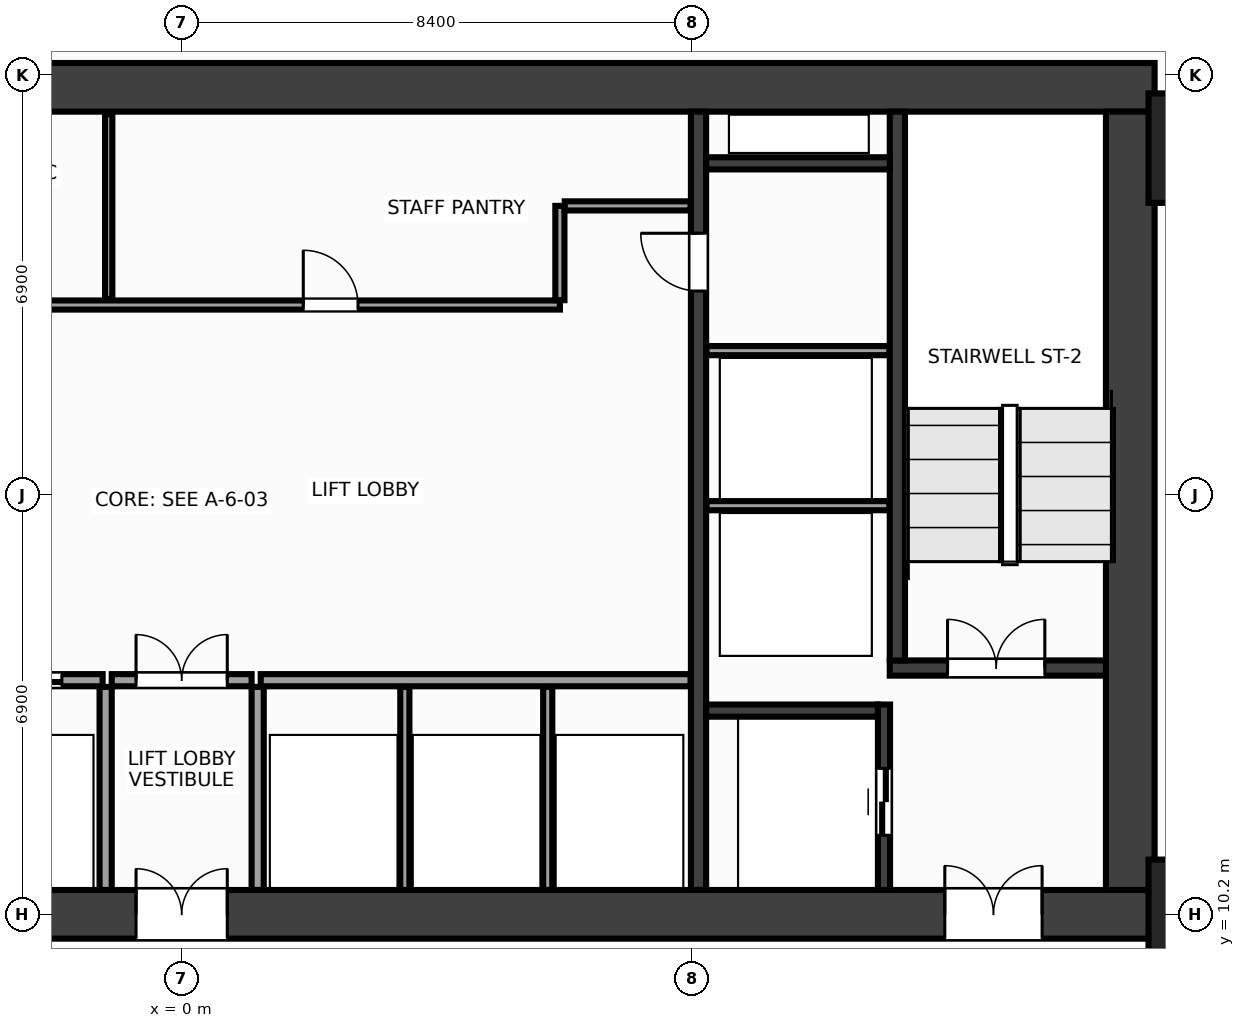
"""IFC4 building model, lengths in metres.
Left out: names, types, materials, properties, quantities, classifications, styles, units other than length and angle.
Written with IfcOpenShell. Run it as: python <this file> out.ifc"""

import sys

from ifc_helpers import new_model, si_unit, direction, frame, frame_2d, origin, origin_2d, place, context, subcontext, project, spatial, rectangle, extrude, source, transform, mapped, element, fill, save


model = new_model("IFC4")
c1 = context("Model", 3, precision=1e-05, world=origin(), true_north=direction((0.0, 1.0)))
c2 = subcontext(c1, "Body", "Model", "MODEL_VIEW")
j1 = project(units=[si_unit("LENGTHUNIT", "METRE"), si_unit("PLANEANGLEUNIT", "RADIAN")], contexts=[c1])
p1 = place(None, origin())
s1 = spatial("IfcSite", under=j1, at=p1, CompositionType="ELEMENT")
p2 = place(p1, origin())
s2 = spatial("IfcBuilding", under=s1, at=p2, CompositionType="ELEMENT")
p3 = place(p2, frame((0.0, 0.0, 27.2)))
s3 = spatial("IfcBuildingStorey", under=s2, at=p3, CompositionType="ELEMENT", Elevation=27.2)
m1 = source(origin(), c2, "Body", "SweptSolid", [
    extrude(rectangle(XDim=32.0, YDim=0.8, at=frame_2d((16.0, 0.0))), origin(), (0.0, 0.0, 1.0), 3.6),
])
p4 = place(p3, frame((-16.0, 23.8, 0.0), z_axis=(0.0, 0.0, 1.0), x_axis=(1.0, 0.0, 0.0)))
e1 = element("IfcWall", 1, at=p4, inside=s3, PredefinedType="SHEAR", context=c2, shape_type="MappedRepresentation", body=[
    mapped(m1, transform((0.0, 0.0, 0.0), x_axis=(1.0, 0.0, 0.0), y_axis=(0.0, 1.0, 0.0), z_axis=(0.0, 0.0, 1.0), scale=1.0)),
])
p5 = place(p3, frame((-16.0, 10.2, 0.0), z_axis=(0.0, 0.0, 1.0), x_axis=(1.0, 0.0, 0.0)))
e2 = element("IfcWall", 2, at=p5, inside=s3, PredefinedType="SHEAR", context=c2, shape_type="MappedRepresentation", body=[
    mapped(m1, transform((0.0, 0.0, 0.0), x_axis=(1.0, 0.0, 0.0), y_axis=(0.0, 1.0, 0.0), z_axis=(0.0, 0.0, 1.0), scale=1.0)),
])
p6 = place(p5, frame((1.85, 0.0, 0.0)))
e3 = element("IfcOpeningElement", 3, at=p6, cuts=e2, PredefinedType="OPENING", context=c2, shape_type="SweptSolid", body=[
    extrude(rectangle(XDim=1.6, YDim=2.15, at=frame_2d((0.8, 1.075))), frame((0.0, 0.412, 0.0), z_axis=(0.0, -1.0, 0.0), x_axis=(1.0, 0.0, 0.0)), (0.0, 0.0, 1.0), 0.824),
])
p7 = place(p5, frame((28.55, 0.0, 0.0)))
e4 = element("IfcOpeningElement", 4, at=p7, cuts=e2, PredefinedType="OPENING", context=c2, shape_type="SweptSolid", body=[
    extrude(rectangle(XDim=1.6, YDim=2.15, at=frame_2d((0.8, 1.075))), frame((0.0, 0.412, 0.0), z_axis=(0.0, -1.0, 0.0), x_axis=(1.0, 0.0, 0.0)), (0.0, 0.0, 1.0), 0.824),
])
p8 = place(p5, frame((15.25, 0.0, 0.0)))
e5 = element("IfcOpeningElement", 5, at=p8, cuts=e2, PredefinedType="OPENING", context=c2, shape_type="SweptSolid", body=[
    extrude(rectangle(XDim=1.5, YDim=2.2, at=frame_2d((0.75, 1.1))), frame((0.0, 0.412, 0.0), z_axis=(0.0, -1.0, 0.0), x_axis=(1.0, 0.0, 0.0)), (0.0, 0.0, 1.0), 0.824),
])
m2 = source(origin(), c2, "Body", "SweptSolid", [
    extrude(rectangle(XDim=12.8, YDim=0.8, at=frame_2d((6.4, 0.0))), origin(), (0.0, 0.0, 1.0), 3.6),
])
p9 = place(p3, frame((15.6, 10.6, 0.0), z_axis=(0.0, 0.0, 1.0), x_axis=(0.0, 1.0, 0.0)))
e6 = element("IfcWall", 6, at=p9, inside=s3, PredefinedType="SHEAR", context=c2, shape_type="MappedRepresentation", body=[
    mapped(m2, transform((0.0, 0.0, 0.0), x_axis=(1.0, 0.0, 0.0), y_axis=(0.0, 1.0, 0.0), z_axis=(0.0, 0.0, 1.0), scale=1.0)),
])
m3 = source(origin(), c2, "Body", "SweptSolid", [
    extrude(rectangle(XDim=12.8, YDim=0.25, at=frame_2d((6.4, 0.0))), origin(), (0.0, 0.0, 1.0), 3.6),
])
p10 = place(p3, frame((8.5, 10.6, 0.0), z_axis=(0.0, 0.0, 1.0), x_axis=(0.0, 1.0, 0.0)))
e7 = element("IfcWall", 7, at=p10, inside=s3, PredefinedType="SHEAR", context=c2, shape_type="MappedRepresentation", body=[
    mapped(m3, transform((0.0, 0.0, 0.0), x_axis=(1.0, 0.0, 0.0), y_axis=(0.0, 1.0, 0.0), z_axis=(0.0, 0.0, 1.0), scale=1.0)),
])
p11 = place(p10, frame((9.85, 0.0, 0.0)))
e8 = element("IfcOpeningElement", 8, at=p11, cuts=e7, PredefinedType="OPENING", context=c2, shape_type="SweptSolid", body=[
    extrude(rectangle(XDim=0.95, YDim=2.15, at=frame_2d((0.475, 1.075))), frame((0.0, 0.137, 0.0), z_axis=(0.0, -1.0, 0.0), x_axis=(1.0, 0.0, 0.0)), (0.0, 0.0, 1.0), 0.274),
])
m4 = source(origin(), c2, "Body", "SweptSolid", [
    extrude(rectangle(XDim=3.555, YDim=0.25, at=frame_2d((1.777, 0.0))), origin(), (0.0, 0.0, 1.0), 3.6),
])
p12 = place(p3, frame((11.645, 14.25, 0.0), z_axis=(0.0, 0.0, 1.0), x_axis=(1.0, 0.0, 0.0)))
e9 = element("IfcWall", 9, at=p12, inside=s3, PredefinedType="SHEAR", context=c2, shape_type="MappedRepresentation", body=[
    mapped(m4, transform((0.0, 0.0, 0.0), x_axis=(1.0, 0.0, 0.0), y_axis=(0.0, 1.0, 0.0), z_axis=(0.0, 0.0, 1.0), scale=1.0)),
])
p13 = place(p12, frame((0.95, 0.0, 0.0)))
e10 = element("IfcOpeningElement", 10, at=p13, cuts=e9, PredefinedType="OPENING", context=c2, shape_type="SweptSolid", body=[
    extrude(rectangle(XDim=1.6, YDim=2.15, at=frame_2d((0.8, 1.075))), frame((0.0, 0.137, 0.0), z_axis=(0.0, -1.0, 0.0), x_axis=(1.0, 0.0, 0.0)), (0.0, 0.0, 1.0), 0.274),
])
m5 = source(origin(), c2, "Body", "SweptSolid", [
    extrude(rectangle(XDim=9.025, YDim=0.25, at=frame_2d((4.512, 0.0))), origin(), (0.0, 0.0, 1.0), 3.6),
])
p14 = place(p3, frame((11.77, 14.375, 0.0), z_axis=(0.0, 0.0, 1.0), x_axis=(0.0, 1.0, 0.0)))
e11 = element("IfcWall", 11, at=p14, inside=s3, PredefinedType="SHEAR", context=c2, shape_type="MappedRepresentation", body=[
    mapped(m5, transform((0.0, 0.0, 0.0), x_axis=(1.0, 0.0, 0.0), y_axis=(0.0, 1.0, 0.0), z_axis=(0.0, 0.0, 1.0), scale=1.0)),
])
m6 = source(origin(), c2, "Body", "SweptSolid", [
    extrude(rectangle(XDim=3.05, YDim=0.2, at=frame_2d((1.525, 0.0))), origin(), (0.0, 0.0, 1.0), 3.6),
])
p15 = place(p3, frame((11.55, 10.6, 0.0), z_axis=(0.0, 0.0, 1.0), x_axis=(0.0, 1.0, 0.0)))
e12 = element("IfcWall", 12, at=p15, inside=s3, PredefinedType="SHEAR", context=c2, shape_type="MappedRepresentation", body=[
    mapped(m6, transform((0.0, 0.0, 0.0), x_axis=(1.0, 0.0, 0.0), y_axis=(0.0, 1.0, 0.0), z_axis=(0.0, 0.0, 1.0), scale=1.0)),
])
p16 = place(p15, frame((0.9, 0.0, 0.0)))
e13 = element("IfcOpeningElement", 13, at=p16, cuts=e12, PredefinedType="OPENING", context=c2, shape_type="SweptSolid", body=[
    extrude(rectangle(XDim=1.1, YDim=2.15, at=frame_2d((0.55, 1.075))), frame((0.0, 0.112, 0.0), z_axis=(0.0, -1.0, 0.0), x_axis=(1.0, 0.0, 0.0)), (0.0, 0.0, 1.0), 0.224),
])
m7 = source(origin(), c2, "Body", "SweptSolid", [
    extrude(rectangle(XDim=2.825, YDim=0.2, at=frame_2d((1.413, 0.0))), origin(), (0.0, 0.0, 1.0), 3.6),
])
p17 = place(p3, frame((8.625, 13.55, 0.0), z_axis=(0.0, 0.0, 1.0), x_axis=(1.0, 0.0, 0.0)))
e14 = element("IfcWall", 14, at=p17, inside=s3, PredefinedType="SHEAR", context=c2, shape_type="MappedRepresentation", body=[
    mapped(m7, transform((0.0, 0.0, 0.0), x_axis=(1.0, 0.0, 0.0), y_axis=(0.0, 1.0, 0.0), z_axis=(0.0, 0.0, 1.0), scale=1.0)),
])
m8 = source(origin(), c2, "Body", "SweptSolid", [
    extrude(rectangle(XDim=3.02, YDim=0.2, at=frame_2d((1.51, 0.0))), origin(), (0.0, 0.0, 1.0), 3.6),
])
p18 = place(p3, frame((8.625, 22.55, 0.0), z_axis=(0.0, 0.0, 1.0), x_axis=(1.0, 0.0, 0.0)))
e15 = element("IfcWall", 15, at=p18, inside=s3, PredefinedType="SHEAR", context=c2, shape_type="MappedRepresentation", body=[
    mapped(m8, transform((0.0, 0.0, 0.0), x_axis=(1.0, 0.0, 0.0), y_axis=(0.0, 1.0, 0.0), z_axis=(0.0, 0.0, 1.0), scale=1.0)),
])
m9 = source(origin(), c2, "Body", "SweptSolid", [
    extrude(rectangle(XDim=1.8, YDim=1.8, at=origin_2d()), origin(), (0.0, 0.0, 1.0), 3.6),
])
for number, where, z_axis, x_axis in (
    (16, (16.8, 10.2, 0.0), (0.0, 0.0, 1.0), (1.0, 0.0, 0.0)),
    (17, (16.8, 22.8, 0.0), (0.0, 0.0, 1.0), (1.0, 0.0, 0.0)),
):
    element("IfcColumn", number, at=place(p3, frame(where, z_axis=z_axis, x_axis=x_axis)), inside=s3, PredefinedType="COLUMN", context=c2, shape_type="MappedRepresentation", body=[
        mapped(m9, transform((0.0, 0.0, 0.0), x_axis=(1.0, 0.0, 0.0), y_axis=(0.0, 1.0, 0.0), z_axis=(0.0, 0.0, 1.0), scale=1.0)),
    ])
m10 = source(origin(), c2, "Body", "SweptSolid", [
    extrude(rectangle(XDim=3.01, YDim=0.15, at=frame_2d((1.505, 0.0))), origin(), (0.0, 0.0, 1.0), 3.36),
])
for number, where, z_axis, x_axis in (
    (18, (8.63, 16.92, 0.0), (0.0, 0.0, 1.0), (1.0, 0.0, 0.0)),
    (19, (8.63, 19.47, 0.0), (0.0, 0.0, 1.0), (1.0, 0.0, 0.0)),
):
    element("IfcWall", number, at=place(p3, frame(where, z_axis=z_axis, x_axis=x_axis)), inside=s3, PredefinedType="PARTITIONING", context=c2, shape_type="MappedRepresentation", body=[
        mapped(m10, transform((0.0, 0.0, 0.0), x_axis=(1.0, 0.0, 0.0), y_axis=(0.0, 1.0, 0.0), z_axis=(0.0, 0.0, 1.0), scale=1.0)),
    ])
m11 = source(origin(), c2, "Body", "SweptSolid", [
    extrude(rectangle(XDim=7.07, YDim=0.2, at=frame_2d((3.535, 0.0))), origin(), (0.0, 0.0, 1.0), 3.36),
])
p19 = place(p3, frame((-8.37, 14.05, 0.0), z_axis=(0.0, 0.0, 1.0), x_axis=(1.0, 0.0, 0.0)))
e20 = element("IfcWall", 20, at=p19, inside=s3, PredefinedType="PARTITIONING", context=c2, shape_type="MappedRepresentation", body=[
    mapped(m11, transform((0.0, 0.0, 0.0), x_axis=(1.0, 0.0, 0.0), y_axis=(0.0, 1.0, 0.0), z_axis=(0.0, 0.0, 1.0), scale=1.0)),
])
p20 = place(p19, frame((0.6, 0.0, 0.0)))
e21 = element("IfcOpeningElement", 21, at=p20, cuts=e20, PredefinedType="OPENING", context=c2, shape_type="SweptSolid", body=[
    extrude(rectangle(XDim=1.1, YDim=2.15, at=frame_2d((0.55, 1.075))), frame((0.0, 0.112, 0.0), z_axis=(0.0, -1.0, 0.0), x_axis=(1.0, 0.0, 0.0)), (0.0, 0.0, 1.0), 0.224),
])
p21 = place(p19, frame((2.95, 0.0, 0.0)))
e22 = element("IfcOpeningElement", 22, at=p21, cuts=e20, PredefinedType="OPENING", context=c2, shape_type="SweptSolid", body=[
    extrude(rectangle(XDim=1.1, YDim=2.15, at=frame_2d((0.55, 1.075))), frame((0.0, 0.112, 0.0), z_axis=(0.0, -1.0, 0.0), x_axis=(1.0, 0.0, 0.0)), (0.0, 0.0, 1.0), 0.224),
])
p22 = place(p19, frame((5.3, 0.0, 0.0)))
e23 = element("IfcOpeningElement", 23, at=p22, cuts=e20, PredefinedType="OPENING", context=c2, shape_type="SweptSolid", body=[
    extrude(rectangle(XDim=1.1, YDim=2.15, at=frame_2d((0.55, 1.075))), frame((0.0, 0.112, 0.0), z_axis=(0.0, -1.0, 0.0), x_axis=(1.0, 0.0, 0.0)), (0.0, 0.0, 1.0), 0.224),
])
p23 = place(p3, frame((1.3, 14.05, 0.0), z_axis=(0.0, 0.0, 1.0), x_axis=(1.0, 0.0, 0.0)))
e24 = element("IfcWall", 24, at=p23, inside=s3, PredefinedType="PARTITIONING", context=c2, shape_type="MappedRepresentation", body=[
    mapped(m11, transform((0.0, 0.0, 0.0), x_axis=(1.0, 0.0, 0.0), y_axis=(0.0, 1.0, 0.0), z_axis=(0.0, 0.0, 1.0), scale=1.0)),
])
m12 = source(origin(), c2, "Body", "SweptSolid", [
    extrude(rectangle(XDim=3.34, YDim=0.2, at=frame_2d((1.67, 0.0))), origin(), (0.0, 0.0, 1.0), 3.36),
])
for number, where, z_axis, x_axis in (
    (25, (-1.25, 10.6, 0.0), (0.0, 0.0, 1.0), (0.0, 1.0, 0.0)),
    (26, (1.25, 10.6, 0.0), (0.0, 0.0, 1.0), (0.0, 1.0, 0.0)),
):
    element("IfcWall", number, at=place(p3, frame(where, z_axis=z_axis, x_axis=x_axis)), inside=s3, PredefinedType="PARTITIONING", context=c2, shape_type="MappedRepresentation", body=[
        mapped(m12, transform((0.0, 0.0, 0.0), x_axis=(1.0, 0.0, 0.0), y_axis=(0.0, 1.0, 0.0), z_axis=(0.0, 0.0, 1.0), scale=1.0)),
    ])
m13 = source(origin(), c2, "Body", "SweptSolid", [
    extrude(rectangle(XDim=2.3, YDim=0.2, at=frame_2d((1.15, 0.0))), origin(), (0.0, 0.0, 1.0), 3.36),
])
p24 = place(p3, frame((-1.15, 14.05, 0.0), z_axis=(0.0, 0.0, 1.0), x_axis=(1.0, 0.0, 0.0)))
e27 = element("IfcWall", 27, at=p24, inside=s3, PredefinedType="PARTITIONING", context=c2, shape_type="MappedRepresentation", body=[
    mapped(m13, transform((0.0, 0.0, 0.0), x_axis=(1.0, 0.0, 0.0), y_axis=(0.0, 1.0, 0.0), z_axis=(0.0, 0.0, 1.0), scale=1.0)),
])
p25 = place(p24, frame((0.4, 0.0, 0.0)))
e28 = element("IfcOpeningElement", 28, at=p25, cuts=e27, PredefinedType="OPENING", context=c2, shape_type="SweptSolid", body=[
    extrude(rectangle(XDim=1.5, YDim=2.2, at=frame_2d((0.75, 1.1))), frame((0.0, 0.112, 0.0), z_axis=(0.0, -1.0, 0.0), x_axis=(1.0, 0.0, 0.0)), (0.0, 0.0, 1.0), 0.224),
])
m14 = source(origin(), c2, "Body", "SweptSolid", [
    extrude(rectangle(XDim=14.59, YDim=0.15, at=frame_2d((7.295, 0.0))), origin(), (0.0, 0.0, 1.0), 3.36),
])
p26 = place(p3, frame((-8.37, 20.22, 0.0), z_axis=(0.0, 0.0, 1.0), x_axis=(1.0, 0.0, 0.0)))
e29 = element("IfcWall", 29, at=p26, inside=s3, PredefinedType="PARTITIONING", context=c2, shape_type="MappedRepresentation", body=[
    mapped(m14, transform((0.0, 0.0, 0.0), x_axis=(1.0, 0.0, 0.0), y_axis=(0.0, 1.0, 0.0), z_axis=(0.0, 0.0, 1.0), scale=1.0)),
])
p27 = place(p26, frame((1.36, 0.0, 0.0)))
e30 = element("IfcOpeningElement", 30, at=p27, cuts=e29, PredefinedType="OPENING", context=c2, shape_type="SweptSolid", body=[
    extrude(rectangle(XDim=0.9, YDim=2.15, at=frame_2d((0.45, 1.075))), frame((0.0, 0.087, 0.0), z_axis=(0.0, -1.0, 0.0), x_axis=(1.0, 0.0, 0.0)), (0.0, 0.0, 1.0), 0.174),
])
p28 = place(p26, frame((4.92, 0.0, 0.0)))
e31 = element("IfcOpeningElement", 31, at=p28, cuts=e29, PredefinedType="OPENING", context=c2, shape_type="SweptSolid", body=[
    extrude(rectangle(XDim=0.9, YDim=2.15, at=frame_2d((0.45, 1.075))), frame((0.0, 0.087, 0.0), z_axis=(0.0, -1.0, 0.0), x_axis=(1.0, 0.0, 0.0)), (0.0, 0.0, 1.0), 0.174),
])
p29 = place(p26, frame((10.37, 0.0, 0.0)))
e32 = element("IfcOpeningElement", 32, at=p29, cuts=e29, PredefinedType="OPENING", context=c2, shape_type="SweptSolid", body=[
    extrude(rectangle(XDim=0.9, YDim=2.15, at=frame_2d((0.45, 1.075))), frame((0.0, 0.087, 0.0), z_axis=(0.0, -1.0, 0.0), x_axis=(1.0, 0.0, 0.0)), (0.0, 0.0, 1.0), 0.174),
])
m15 = source(origin(), c2, "Body", "SweptSolid", [
    extrude(rectangle(XDim=1.55, YDim=0.15, at=frame_2d((0.775, 0.0))), origin(), (0.0, 0.0, 1.0), 3.36),
])
p30 = place(p3, frame((6.22, 20.3, 0.0), z_axis=(0.0, 0.0, 1.0), x_axis=(0.0, 1.0, 0.0)))
e33 = element("IfcWall", 33, at=p30, inside=s3, PredefinedType="PARTITIONING", context=c2, shape_type="MappedRepresentation", body=[
    mapped(m15, transform((0.0, 0.0, 0.0), x_axis=(1.0, 0.0, 0.0), y_axis=(0.0, 1.0, 0.0), z_axis=(0.0, 0.0, 1.0), scale=1.0)),
])
m16 = source(origin(), c2, "Body", "SweptSolid", [
    extrude(rectangle(XDim=2.07, YDim=0.15, at=frame_2d((1.035, 0.0))), origin(), (0.0, 0.0, 1.0), 3.36),
])
p31 = place(p3, frame((6.3, 21.85, 0.0), z_axis=(0.0, 0.0, 1.0), x_axis=(1.0, 0.0, 0.0)))
e34 = element("IfcWall", 34, at=p31, inside=s3, PredefinedType="PARTITIONING", context=c2, shape_type="MappedRepresentation", body=[
    mapped(m16, transform((0.0, 0.0, 0.0), x_axis=(1.0, 0.0, 0.0), y_axis=(0.0, 1.0, 0.0), z_axis=(0.0, 0.0, 1.0), scale=1.0)),
])
m17 = source(origin(), c2, "Body", "SweptSolid", [
    extrude(rectangle(XDim=3.34, YDim=0.15, at=frame_2d((1.67, 0.0))), origin(), (0.0, 0.0, 1.0), 3.36),
])
for number, where, z_axis, x_axis in (
    (35, (3.67, 10.6, 0.0), (0.0, 0.0, 1.0), (0.0, 1.0, 0.0)),
    (36, (6.02, 10.6, 0.0), (0.0, 0.0, 1.0), (0.0, 1.0, 0.0)),
):
    element("IfcWall", number, at=place(p3, frame(where, z_axis=z_axis, x_axis=x_axis)), inside=s3, PredefinedType="PARTITIONING", context=c2, shape_type="MappedRepresentation", body=[
        mapped(m17, transform((0.0, 0.0, 0.0), x_axis=(1.0, 0.0, 0.0), y_axis=(0.0, 1.0, 0.0), z_axis=(0.0, 0.0, 1.0), scale=1.0)),
    ])
m18 = source(origin(), c2, "Body", "SweptSolid", [
    extrude(rectangle(XDim=3.04, YDim=0.12, at=frame_2d((1.52, 0.0))), origin(), (0.0, 0.0, 1.0), 3.36),
])
p32 = place(p3, frame((-1.2, 20.32, 0.0), z_axis=(0.0, 0.0, 1.0), x_axis=(0.0, 1.0, 0.0)))
e37 = element("IfcWall", 37, at=p32, inside=s3, PredefinedType="PARTITIONING", context=c2, shape_type="MappedRepresentation", body=[
    mapped(m18, transform((0.0, 0.0, 0.0), x_axis=(1.0, 0.0, 0.0), y_axis=(0.0, 1.0, 0.0), z_axis=(0.0, 0.0, 1.0), scale=1.0)),
])
m19 = source(origin(), c2, "Body", "SweptSolid", [
    extrude(rectangle(XDim=1.6, YDim=2.15, at=frame_2d((0.8, 1.075))), frame((0.0, 0.025, 0.0), z_axis=(0.0, -1.0, 0.0), x_axis=(1.0, 0.0, 0.0)), (0.0, 0.0, 1.0), 0.05),
])
p33 = place(p13, origin())
e38 = element("IfcDoor", 38, at=p33, inside=s3, OperationType="DOUBLE_DOOR_SINGLE_SWING", PredefinedType="DOOR", context=c2, shape_type="MappedRepresentation", body=[
    mapped(m19, transform((0.0, 0.0, 0.0), x_axis=(1.0, 0.0, 0.0), y_axis=(0.0, 1.0, 0.0), z_axis=(0.0, 0.0, 1.0), scale=1.0)),
])
fill(e10, e38)
p34 = place(p7, origin())
e39 = element("IfcDoor", 39, at=p34, inside=s3, OperationType="DOUBLE_DOOR_SINGLE_SWING", PredefinedType="DOOR", context=c2, shape_type="MappedRepresentation", body=[
    mapped(m19, transform((0.0, 0.0, 0.0), x_axis=(1.0, 0.0, 0.0), y_axis=(0.0, 1.0, 0.0), z_axis=(0.0, 0.0, 1.0), scale=1.0)),
])
fill(e4, e39)
m20 = source(origin(), c2, "Body", "SweptSolid", [
    extrude(rectangle(XDim=1.1, YDim=2.15, at=frame_2d((0.55, 1.075))), frame((0.0, 0.025, 0.0), z_axis=(0.0, -1.0, 0.0), x_axis=(1.0, 0.0, 0.0)), (0.0, 0.0, 1.0), 0.05),
])
p35 = place(p16, origin())
e40 = element("IfcDoor", 40, at=p35, inside=s3, OperationType="DOUBLE_DOOR_SLIDING", PredefinedType="DOOR", context=c2, shape_type="MappedRepresentation", body=[
    mapped(m20, transform((0.0, 0.0, 0.0), x_axis=(1.0, 0.0, 0.0), y_axis=(0.0, 1.0, 0.0), z_axis=(0.0, 0.0, 1.0), scale=1.0)),
])
fill(e13, e40)
m21 = source(origin(), c2, "Body", "SweptSolid", [
    extrude(rectangle(XDim=0.95, YDim=2.15, at=frame_2d((0.475, 1.075))), frame((0.0, 0.025, 0.0), z_axis=(0.0, -1.0, 0.0), x_axis=(1.0, 0.0, 0.0)), (0.0, 0.0, 1.0), 0.05),
])
p36 = place(p11, origin())
e41 = element("IfcDoor", 41, at=p36, inside=s3, OperationType="SINGLE_SWING_RIGHT", PredefinedType="DOOR", context=c2, shape_type="MappedRepresentation", body=[
    mapped(m21, transform((0.0, 0.0, 0.0), x_axis=(1.0, 0.0, 0.0), y_axis=(0.0, 1.0, 0.0), z_axis=(0.0, 0.0, 1.0), scale=1.0)),
])
fill(e8, e41)
p37 = place(p22, origin())
e42 = element("IfcDoor", 42, at=p37, inside=s3, OperationType="DOUBLE_DOOR_SLIDING", PredefinedType="DOOR", context=c2, shape_type="MappedRepresentation", body=[
    mapped(m20, transform((0.0, 0.0, 0.0), x_axis=(1.0, 0.0, 0.0), y_axis=(0.0, 1.0, 0.0), z_axis=(0.0, 0.0, 1.0), scale=1.0)),
])
fill(e23, e42)
m22 = source(origin(), c2, "Body", "SweptSolid", [
    extrude(rectangle(XDim=1.5, YDim=2.2, at=frame_2d((0.75, 1.1))), frame((0.0, 0.025, 0.0), z_axis=(0.0, -1.0, 0.0), x_axis=(1.0, 0.0, 0.0)), (0.0, 0.0, 1.0), 0.05),
])
p38 = place(p25, origin())
e43 = element("IfcDoor", 43, at=p38, inside=s3, OperationType="DOUBLE_DOOR_SINGLE_SWING", PredefinedType="DOOR", context=c2, shape_type="MappedRepresentation", body=[
    mapped(m22, transform((0.0, 0.0, 0.0), x_axis=(1.0, 0.0, 0.0), y_axis=(0.0, 1.0, 0.0), z_axis=(0.0, 0.0, 1.0), scale=1.0)),
])
fill(e28, e43)
p39 = place(p8, origin())
e44 = element("IfcDoor", 44, at=p39, inside=s3, OperationType="DOUBLE_DOOR_SINGLE_SWING", PredefinedType="DOOR", context=c2, shape_type="MappedRepresentation", body=[
    mapped(m22, transform((0.0, 0.0, 0.0), x_axis=(1.0, 0.0, 0.0), y_axis=(0.0, 1.0, 0.0), z_axis=(0.0, 0.0, 1.0), scale=1.0)),
])
fill(e5, e44)
m23 = source(origin(), c2, "Body", "SweptSolid", [
    extrude(rectangle(XDim=0.9, YDim=2.15, at=frame_2d((0.45, 1.075))), frame((0.0, 0.025, 0.0), z_axis=(0.0, -1.0, 0.0), x_axis=(1.0, 0.0, 0.0)), (0.0, 0.0, 1.0), 0.05),
])
p40 = place(p29, origin())
e45 = element("IfcDoor", 45, at=p40, inside=s3, OperationType="SINGLE_SWING_LEFT", PredefinedType="DOOR", context=c2, shape_type="MappedRepresentation", body=[
    mapped(m23, transform((0.0, 0.0, 0.0), x_axis=(1.0, 0.0, 0.0), y_axis=(0.0, 1.0, 0.0), z_axis=(0.0, 0.0, 1.0), scale=1.0)),
])
fill(e32, e45)
save(model, sys.argv[1])
